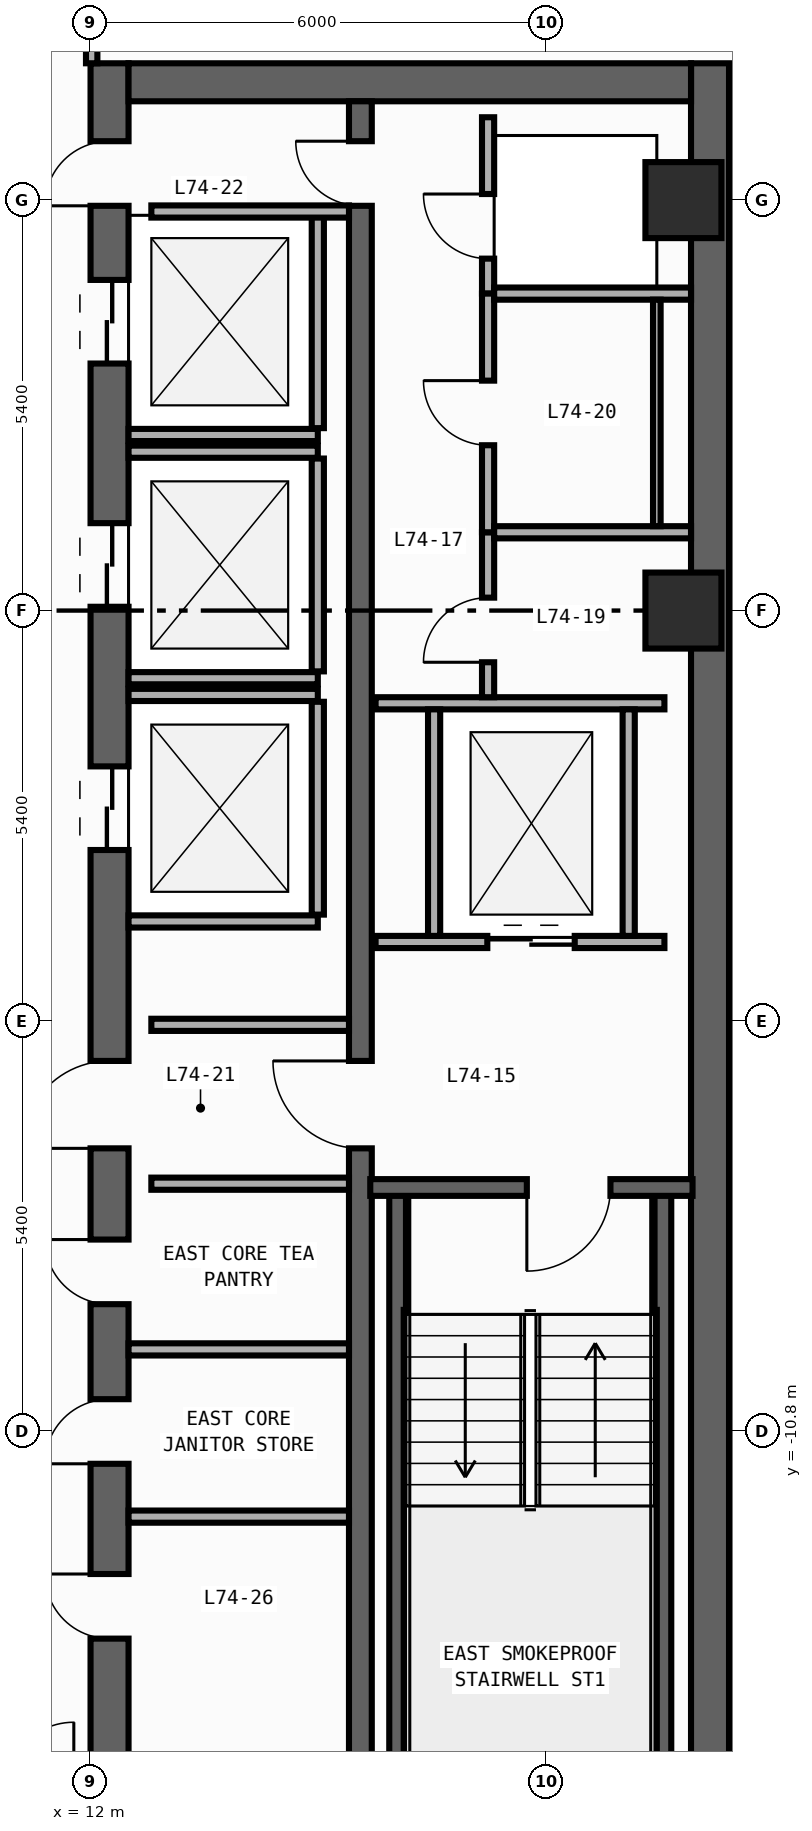
"""IFC4 building model, lengths in metres.
Left out: names, types, materials, properties, quantities, classifications, styles, units other than length and angle.
Written with IfcOpenShell. Run it as: python <this file> out.ifc"""

import sys

from ifc_helpers import new_model, si_unit, direction, frame, frame_2d, origin, origin_2d, place, context, subcontext, project, spatial, rectangle, circle, extrude, element, fill, save


model = new_model("IFC4")
c1 = context("Model", 3, precision=1e-05, world=origin(), true_north=direction((0.0, 1.0)))
c2 = subcontext(c1, "Body", "Model", "MODEL_VIEW")
j1 = project(units=[si_unit("LENGTHUNIT", "METRE"), si_unit("PLANEANGLEUNIT", "RADIAN")], contexts=[c1])
p1 = place(None, origin())
s1 = spatial("IfcSite", under=j1, at=p1, CompositionType="ELEMENT")
p2 = place(p1, origin())
s2 = spatial("IfcBuilding", under=s1, at=p2, CompositionType="ELEMENT")
p3 = place(p2, frame((0.0, 0.0, 308.0)))
s3 = spatial("IfcBuildingStorey", under=s2, at=p3, CompositionType="ELEMENT", Elevation=308.0)
p4 = place(p3, frame((12.25, -19.8, 0.0), z_axis=(0.0, 0.0, 1.0), x_axis=(0.0, 1.0, 0.0)))
e1 = element("IfcWall", 1, at=p4, inside=s3, PredefinedType="SHEAR", context=c2, shape_type="SweptSolid", body=[
    extrude(rectangle(XDim=27.0, YDim=0.5, at=frame_2d((13.5, 0.0))), origin(), (0.0, 0.0, 1.0), 3.54),
])
p5 = place(p4, frame((23.05, 0.0, 0.0)))
e2 = element("IfcOpeningElement", 2, at=p5, cuts=e1, PredefinedType="OPENING", context=c2, shape_type="SweptSolid", body=[
    extrude(rectangle(XDim=1.1, YDim=2.2, at=frame_2d((0.55, 1.1))), frame((0.0, 0.26, 0.0), z_axis=(0.0, -1.0, 0.0), x_axis=(1.0, 0.0, 0.0)), (0.0, 0.0, 1.0), 0.52),
])
p6 = place(p4, frame((19.85, 0.0, 0.0)))
e3 = element("IfcOpeningElement", 3, at=p6, cuts=e1, PredefinedType="OPENING", context=c2, shape_type="SweptSolid", body=[
    extrude(rectangle(XDim=1.1, YDim=2.2, at=frame_2d((0.55, 1.1))), frame((0.0, 0.26, 0.0), z_axis=(0.0, -1.0, 0.0), x_axis=(1.0, 0.0, 0.0)), (0.0, 0.0, 1.0), 0.52),
])
p7 = place(p4, frame((16.65, 0.0, 0.0)))
e4 = element("IfcOpeningElement", 4, at=p7, cuts=e1, PredefinedType="OPENING", context=c2, shape_type="SweptSolid", body=[
    extrude(rectangle(XDim=1.1, YDim=2.2, at=frame_2d((0.55, 1.1))), frame((0.0, 0.26, 0.0), z_axis=(0.0, -1.0, 0.0), x_axis=(1.0, 0.0, 0.0)), (0.0, 0.0, 1.0), 0.52),
])
p8 = place(p4, frame((6.275, 0.0, 0.0)))
e5 = element("IfcOpeningElement", 5, at=p8, cuts=e1, PredefinedType="OPENING", context=c2, shape_type="SweptSolid", body=[
    extrude(rectangle(XDim=0.85, YDim=2.1, at=frame_2d((0.425, 1.05))), frame((0.0, 0.26, 0.0), z_axis=(0.0, -1.0, 0.0), x_axis=(1.0, 0.0, 0.0)), (0.0, 0.0, 1.0), 0.52),
])
p9 = place(p4, frame((8.575, 0.0, 0.0)))
e6 = element("IfcOpeningElement", 6, at=p9, cuts=e1, PredefinedType="OPENING", context=c2, shape_type="SweptSolid", body=[
    extrude(rectangle(XDim=0.85, YDim=2.1, at=frame_2d((0.425, 1.05))), frame((0.0, 0.26, 0.0), z_axis=(0.0, -1.0, 0.0), x_axis=(1.0, 0.0, 0.0)), (0.0, 0.0, 1.0), 0.52),
])
p10 = place(p4, frame((10.675, 0.0, 0.0)))
e7 = element("IfcOpeningElement", 7, at=p10, cuts=e1, PredefinedType="OPENING", context=c2, shape_type="SweptSolid", body=[
    extrude(rectangle(XDim=0.85, YDim=2.1, at=frame_2d((0.425, 1.05))), frame((0.0, 0.26, 0.0), z_axis=(0.0, -1.0, 0.0), x_axis=(1.0, 0.0, 0.0)), (0.0, 0.0, 1.0), 0.52),
])
p11 = place(p4, frame((12.725, 0.0, 0.0)))
e8 = element("IfcOpeningElement", 8, at=p11, cuts=e1, PredefinedType="OPENING", context=c2, shape_type="SweptSolid", body=[
    extrude(rectangle(XDim=1.15, YDim=2.2, at=frame_2d((0.575, 1.1))), frame((0.0, 0.26, 0.0), z_axis=(0.0, -1.0, 0.0), x_axis=(1.0, 0.0, 0.0)), (0.0, 0.0, 1.0), 0.52),
])
p12 = place(p4, frame((25.125, 0.0, 0.0)))
e9 = element("IfcOpeningElement", 9, at=p12, cuts=e1, PredefinedType="OPENING", context=c2, shape_type="SweptSolid", body=[
    extrude(rectangle(XDim=0.85, YDim=2.1, at=frame_2d((0.425, 1.05))), frame((0.0, 0.26, 0.0), z_axis=(0.0, -1.0, 0.0), x_axis=(1.0, 0.0, 0.0)), (0.0, 0.0, 1.0), 0.52),
])
p13 = place(p3, frame((20.15, -19.8, 0.0), z_axis=(0.0, 0.0, 1.0), x_axis=(0.0, 1.0, 0.0)))
e10 = element("IfcWall", 10, at=p13, inside=s3, PredefinedType="SHEAR", context=c2, shape_type="SweptSolid", body=[
    extrude(rectangle(XDim=27.0, YDim=0.5, at=frame_2d((13.5, 0.0))), origin(), (0.0, 0.0, 1.0), 3.54),
])
p14 = place(p3, frame((12.5, 6.95, 0.0), z_axis=(0.0, 0.0, 1.0), x_axis=(1.0, 0.0, 0.0)))
e11 = element("IfcWall", 11, at=p14, inside=s3, PredefinedType="SHEAR", context=c2, shape_type="SweptSolid", body=[
    extrude(rectangle(XDim=7.4, YDim=0.5, at=frame_2d((3.7, 0.0))), origin(), (0.0, 0.0, 1.0), 3.54),
])
p15 = place(p3, frame((15.55, -19.3, 0.0), z_axis=(0.0, 0.0, 1.0), x_axis=(0.0, 1.0, 0.0)))
e12 = element("IfcWall", 12, at=p15, inside=s3, PredefinedType="SHEAR", context=c2, shape_type="SweptSolid", body=[
    extrude(rectangle(XDim=26.0, YDim=0.3, at=frame_2d((13.0, 0.0))), origin(), (0.0, 0.0, 1.0), 3.54),
])
p16 = place(p15, frame((12.225, 0.0, 0.0)))
e13 = element("IfcOpeningElement", 13, at=p16, cuts=e12, PredefinedType="OPENING", context=c2, shape_type="SweptSolid", body=[
    extrude(rectangle(XDim=1.15, YDim=2.2, at=frame_2d((0.575, 1.1))), frame((0.0, 0.16, 0.0), z_axis=(0.0, -1.0, 0.0), x_axis=(1.0, 0.0, 0.0)), (0.0, 0.0, 1.0), 0.32),
])
p17 = place(p15, frame((24.625, 0.0, 0.0)))
e14 = element("IfcOpeningElement", 14, at=p17, cuts=e12, PredefinedType="OPENING", context=c2, shape_type="SweptSolid", body=[
    extrude(rectangle(XDim=0.85, YDim=2.1, at=frame_2d((0.425, 1.05))), frame((0.0, 0.16, 0.0), z_axis=(0.0, -1.0, 0.0), x_axis=(1.0, 0.0, 0.0)), (0.0, 0.0, 1.0), 0.32),
])
for number, where, z_axis, x_axis in (
    (15, (16.04, -19.01, 0.0), (0.0, 0.0, 1.0), (0.0, 1.0, 0.0)),
    (16, (19.53, -19.01, 0.0), (0.0, 0.0, 1.0), (0.0, 1.0, 0.0)),
):
    element("IfcWall", number, at=place(p3, frame(where, z_axis=z_axis, x_axis=x_axis)), inside=s3, PredefinedType="SHEAR", context=c2, shape_type="SweptSolid", body=[
        extrude(rectangle(XDim=11.42, YDim=0.22, at=frame_2d((5.71, 0.0))), origin(), (0.0, 0.0, 1.0), 3.54),
    ])
p18 = place(p3, frame((19.92, -7.59, 0.0), z_axis=(0.0, 0.0, 1.0), x_axis=(-1.0, 0.0, 0.0)))
e17 = element("IfcWall", 17, at=p18, inside=s3, PredefinedType="SHEAR", context=c2, shape_type="SweptSolid", body=[
    extrude(rectangle(XDim=4.24, YDim=0.22, at=frame_2d((2.12, 0.0))), origin(), (0.0, 0.0, 1.0), 3.54),
])
p19 = place(p18, frame((1.08, 0.0, 0.0)))
e18 = element("IfcOpeningElement", 18, at=p19, cuts=e17, PredefinedType="OPENING", context=c2, shape_type="SweptSolid", body=[
    extrude(rectangle(XDim=1.1, YDim=2.2, at=frame_2d((0.55, 1.1))), frame((0.0, 0.12, 0.0), z_axis=(0.0, -1.0, 0.0), x_axis=(1.0, 0.0, 0.0)), (0.0, 0.0, 1.0), 0.24),
])
for number, where, z_axis, x_axis in (
    (19, (19.8, 0.0, 0.0), (0.0, 0.0, 1.0), (1.0, 0.0, 0.0)),
    (20, (19.8, 5.4, 0.0), (0.0, 0.0, 1.0), (1.0, 0.0, 0.0)),
):
    element("IfcColumn", number, at=place(p3, frame(where, z_axis=z_axis, x_axis=x_axis)), inside=s3, PredefinedType="COLUMN", context=c2, shape_type="SweptSolid", body=[
        extrude(circle(Radius=0.5, at=origin_2d()), origin(), (0.0, 0.0, 1.0), 3.8),
    ])
p20 = place(p3, frame((12.5, 2.31, 0.0), z_axis=(0.0, 0.0, 1.0), x_axis=(1.0, 0.0, 0.0)))
e21 = element("IfcWall", 21, at=p20, inside=s3, PredefinedType="STANDARD", context=c2, shape_type="SweptSolid", body=[
    extrude(rectangle(XDim=2.49, YDim=0.16, at=frame_2d((1.245, 0.0))), origin(), (0.0, 0.0, 1.0), 3.54),
])
p21 = place(p3, frame((14.99, 2.4, 0.0), z_axis=(0.0, 0.0, 1.0), x_axis=(0.0, 1.0, 0.0)))
e22 = element("IfcWall", 22, at=p21, inside=s3, PredefinedType="STANDARD", context=c2, shape_type="SweptSolid", body=[
    extrude(rectangle(XDim=2.8, YDim=0.16, at=frame_2d((1.4, 0.0))), origin(), (0.0, 0.0, 1.0), 3.54),
])
for number, where, z_axis, x_axis in (
    (23, (12.5, -0.89, 0.0), (0.0, 0.0, 1.0), (1.0, 0.0, 0.0)),
    (24, (12.5, 2.09, 0.0), (0.0, 0.0, 1.0), (1.0, 0.0, 0.0)),
):
    element("IfcWall", number, at=place(p3, frame(where, z_axis=z_axis, x_axis=x_axis)), inside=s3, PredefinedType="STANDARD", context=c2, shape_type="SweptSolid", body=[
        extrude(rectangle(XDim=2.49, YDim=0.16, at=frame_2d((1.245, 0.0))), origin(), (0.0, 0.0, 1.0), 3.54),
    ])
p22 = place(p3, frame((14.99, -0.8, 0.0), z_axis=(0.0, 0.0, 1.0), x_axis=(0.0, 1.0, 0.0)))
e25 = element("IfcWall", 25, at=p22, inside=s3, PredefinedType="STANDARD", context=c2, shape_type="SweptSolid", body=[
    extrude(rectangle(XDim=2.8, YDim=0.16, at=frame_2d((1.4, 0.0))), origin(), (0.0, 0.0, 1.0), 3.54),
])
for number, where, z_axis, x_axis in (
    (26, (12.5, -4.09, 0.0), (0.0, 0.0, 1.0), (1.0, 0.0, 0.0)),
    (27, (12.5, -1.11, 0.0), (0.0, 0.0, 1.0), (1.0, 0.0, 0.0)),
):
    element("IfcWall", number, at=place(p3, frame(where, z_axis=z_axis, x_axis=x_axis)), inside=s3, PredefinedType="STANDARD", context=c2, shape_type="SweptSolid", body=[
        extrude(rectangle(XDim=2.49, YDim=0.16, at=frame_2d((1.245, 0.0))), origin(), (0.0, 0.0, 1.0), 3.54),
    ])
p23 = place(p3, frame((14.99, -4.0, 0.0), z_axis=(0.0, 0.0, 1.0), x_axis=(0.0, 1.0, 0.0)))
e28 = element("IfcWall", 28, at=p23, inside=s3, PredefinedType="STANDARD", context=c2, shape_type="SweptSolid", body=[
    extrude(rectangle(XDim=2.8, YDim=0.16, at=frame_2d((1.4, 0.0))), origin(), (0.0, 0.0, 1.0), 3.54),
])
p24 = place(p3, frame((15.75, -4.36, 0.0), z_axis=(0.0, 0.0, 1.0), x_axis=(1.0, 0.0, 0.0)))
e29 = element("IfcWall", 29, at=p24, inside=s3, PredefinedType="STANDARD", context=c2, shape_type="SweptSolid", body=[
    extrude(rectangle(XDim=3.8, YDim=0.16, at=frame_2d((1.9, 0.0))), origin(), (0.0, 0.0, 1.0), 3.54),
])
p25 = place(p24, frame((1.47, 0.0, 0.0)))
e30 = element("IfcOpeningElement", 30, at=p25, cuts=e29, PredefinedType="OPENING", context=c2, shape_type="SweptSolid", body=[
    extrude(rectangle(XDim=1.15, YDim=2.2, at=frame_2d((0.575, 1.1))), frame((0.0, 0.09, 0.0), z_axis=(0.0, -1.0, 0.0), x_axis=(1.0, 0.0, 0.0)), (0.0, 0.0, 1.0), 0.18),
])
p26 = place(p3, frame((15.75, -1.22, 0.0), z_axis=(0.0, 0.0, 1.0), x_axis=(1.0, 0.0, 0.0)))
e31 = element("IfcWall", 31, at=p26, inside=s3, PredefinedType="STANDARD", context=c2, shape_type="SweptSolid", body=[
    extrude(rectangle(XDim=3.8, YDim=0.16, at=frame_2d((1.9, 0.0))), origin(), (0.0, 0.0, 1.0), 3.54),
])
for number, where, z_axis, x_axis in (
    (32, (16.52, -4.28, 0.0), (0.0, 0.0, 1.0), (0.0, 1.0, 0.0)),
    (33, (19.08, -4.28, 0.0), (0.0, 0.0, 1.0), (0.0, 1.0, 0.0)),
):
    element("IfcWall", number, at=place(p3, frame(where, z_axis=z_axis, x_axis=x_axis)), inside=s3, PredefinedType="STANDARD", context=c2, shape_type="SweptSolid", body=[
        extrude(rectangle(XDim=2.98, YDim=0.16, at=frame_2d((1.49, 0.0))), origin(), (0.0, 0.0, 1.0), 3.54),
    ])
for number, where, z_axis, x_axis in (
    (34, (12.8, -5.45, 0.0), (0.0, 0.0, 1.0), (1.0, 0.0, 0.0)),
    (35, (12.8, -7.54, 0.0), (0.0, 0.0, 1.0), (1.0, 0.0, 0.0)),
    (36, (12.8, 5.25, 0.0), (0.0, 0.0, 1.0), (1.0, 0.0, 0.0)),
):
    element("IfcWall", number, at=place(p3, frame(where, z_axis=z_axis, x_axis=x_axis)), inside=s3, PredefinedType="STANDARD", context=c2, shape_type="SweptSolid", body=[
        extrude(rectangle(XDim=2.6, YDim=0.16, at=frame_2d((1.3, 0.0))), origin(), (0.0, 0.0, 1.0), 3.54),
    ])
p27 = place(p3, frame((17.23, 4.17, 0.0), z_axis=(0.0, 0.0, 1.0), x_axis=(0.0, 1.0, 0.0)))
e37 = element("IfcWall", 37, at=p27, inside=s3, PredefinedType="PARTITIONING", context=c2, shape_type="SweptSolid", body=[
    extrude(rectangle(XDim=2.32, YDim=0.16, at=frame_2d((1.16, 0.0))), origin(), (0.0, 0.0, 1.0), 3.54),
])
p28 = place(p27, frame((0.46, 0.0, 0.0)))
e38 = element("IfcOpeningElement", 38, at=p28, cuts=e37, PredefinedType="OPENING", context=c2, shape_type="SweptSolid", body=[
    extrude(rectangle(XDim=0.85, YDim=2.1, at=frame_2d((0.425, 1.05))), frame((0.0, 0.09, 0.0), z_axis=(0.0, -1.0, 0.0), x_axis=(1.0, 0.0, 0.0)), (0.0, 0.0, 1.0), 0.18),
])
p29 = place(p3, frame((17.23, -1.14, 0.0), z_axis=(0.0, 0.0, 1.0), x_axis=(0.0, 1.0, 0.0)))
e39 = element("IfcWall", 39, at=p29, inside=s3, PredefinedType="PARTITIONING", context=c2, shape_type="SweptSolid", body=[
    extrude(rectangle(XDim=2.17, YDim=0.16, at=frame_2d((1.085, 0.0))), origin(), (0.0, 0.0, 1.0), 3.54),
])
p30 = place(p29, frame((0.46, 0.0, 0.0)))
e40 = element("IfcOpeningElement", 40, at=p30, cuts=e39, PredefinedType="OPENING", context=c2, shape_type="SweptSolid", body=[
    extrude(rectangle(XDim=0.85, YDim=2.1, at=frame_2d((0.425, 1.05))), frame((0.0, 0.09, 0.0), z_axis=(0.0, -1.0, 0.0), x_axis=(1.0, 0.0, 0.0)), (0.0, 0.0, 1.0), 0.18),
])
p31 = place(p3, frame((17.23, 1.03, 0.0), z_axis=(0.0, 0.0, 1.0), x_axis=(0.0, 1.0, 0.0)))
e41 = element("IfcWall", 41, at=p31, inside=s3, PredefinedType="PARTITIONING", context=c2, shape_type="SweptSolid", body=[
    extrude(rectangle(XDim=3.14, YDim=0.16, at=frame_2d((1.57, 0.0))), origin(), (0.0, 0.0, 1.0), 3.54),
])
p32 = place(p31, frame((1.145, 0.0, 0.0)))
e42 = element("IfcOpeningElement", 42, at=p32, cuts=e41, PredefinedType="OPENING", context=c2, shape_type="SweptSolid", body=[
    extrude(rectangle(XDim=0.85, YDim=2.1, at=frame_2d((0.425, 1.05))), frame((0.0, 0.09, 0.0), z_axis=(0.0, -1.0, 0.0), x_axis=(1.0, 0.0, 0.0)), (0.0, 0.0, 1.0), 0.18),
])
for number, where, z_axis, x_axis in (
    (43, (17.31, 4.17, 0.0), (0.0, 0.0, 1.0), (1.0, 0.0, 0.0)),
    (44, (17.31, 1.03, 0.0), (0.0, 0.0, 1.0), (1.0, 0.0, 0.0)),
):
    element("IfcWall", number, at=place(p3, frame(where, z_axis=z_axis, x_axis=x_axis)), inside=s3, PredefinedType="PARTITIONING", context=c2, shape_type="SweptSolid", body=[
        extrude(rectangle(XDim=2.59, YDim=0.16, at=frame_2d((1.295, 0.0))), origin(), (0.0, 0.0, 1.0), 3.54),
    ])
for number, where, z_axis, x_axis in (
    (45, (12.5, -11.92, 0.0), (0.0, 0.0, 1.0), (1.0, 0.0, 0.0)),
    (46, (12.5, -9.72, 0.0), (0.0, 0.0, 1.0), (1.0, 0.0, 0.0)),
):
    element("IfcWall", number, at=place(p3, frame(where, z_axis=z_axis, x_axis=x_axis)), inside=s3, PredefinedType="PARTITIONING", context=c2, shape_type="SweptSolid", body=[
        extrude(rectangle(XDim=2.9, YDim=0.16, at=frame_2d((1.45, 0.0))), origin(), (0.0, 0.0, 1.0), 3.54),
    ])
p33 = place(p3, frame((12.015, 7.2, 0.0), z_axis=(0.0, 0.0, 1.0), x_axis=(0.0, 1.0, 0.0)))
e47 = element("IfcWall", 47, at=p33, inside=s3, PredefinedType="PARTITIONING", context=c2, shape_type="SweptSolid", body=[
    extrude(rectangle(XDim=6.68, YDim=0.15, at=frame_2d((3.34, 0.0))), origin(), (0.0, 0.0, 1.0), 3.54),
])
p34 = place(p33, frame((0.67, 0.0, 0.0)))
e48 = element("IfcOpeningElement", 48, at=p34, cuts=e47, PredefinedType="OPENING", context=c2, shape_type="SweptSolid", body=[
    extrude(rectangle(XDim=0.9, YDim=2.15, at=frame_2d((0.45, 1.075))), frame((0.0, 0.085, 0.0), z_axis=(0.0, -1.0, 0.0), x_axis=(1.0, 0.0, 0.0)), (0.0, 0.0, 1.0), 0.17),
])
p35 = place(p3, frame((19.45, 4.09, 0.0), z_axis=(0.0, 0.0, 1.0), x_axis=(0.0, -1.0, 0.0)))
e49 = element("IfcWall", 49, at=p35, inside=s3, PredefinedType="PARTITIONING", context=c2, shape_type="SweptSolid", body=[
    extrude(rectangle(XDim=2.98, YDim=0.1, at=frame_2d((1.49, 0.0))), origin(), (0.0, 0.0, 1.0), 3.54),
])
p36 = place(p19, origin())
e50 = element("IfcDoor", 50, at=p36, inside=s3, OperationType="SINGLE_SWING_RIGHT", PredefinedType="DOOR", context=c2, shape_type="SweptSolid", body=[
    extrude(rectangle(XDim=1.1, YDim=2.2, at=frame_2d((0.55, 1.1))), frame((0.0, 0.025, 0.0), z_axis=(0.0, -1.0, 0.0), x_axis=(1.0, 0.0, 0.0)), (0.0, 0.0, 1.0), 0.05),
])
fill(e18, e50)
p37 = place(p5, origin())
e51 = element("IfcDoor", 51, at=p37, inside=s3, OperationType="DOUBLE_DOOR_SLIDING", PredefinedType="DOOR", context=c2, shape_type="SweptSolid", body=[
    extrude(rectangle(XDim=1.1, YDim=2.2, at=frame_2d((0.55, 1.1))), frame((0.0, 0.025, 0.0), z_axis=(0.0, -1.0, 0.0), x_axis=(1.0, 0.0, 0.0)), (0.0, 0.0, 1.0), 0.05),
])
fill(e2, e51)
p38 = place(p6, origin())
e52 = element("IfcDoor", 52, at=p38, inside=s3, OperationType="DOUBLE_DOOR_SLIDING", PredefinedType="DOOR", context=c2, shape_type="SweptSolid", body=[
    extrude(rectangle(XDim=1.1, YDim=2.2, at=frame_2d((0.55, 1.1))), frame((0.0, 0.025, 0.0), z_axis=(0.0, -1.0, 0.0), x_axis=(1.0, 0.0, 0.0)), (0.0, 0.0, 1.0), 0.05),
])
fill(e3, e52)
p39 = place(p7, origin())
e53 = element("IfcDoor", 53, at=p39, inside=s3, OperationType="DOUBLE_DOOR_SLIDING", PredefinedType="DOOR", context=c2, shape_type="SweptSolid", body=[
    extrude(rectangle(XDim=1.1, YDim=2.2, at=frame_2d((0.55, 1.1))), frame((0.0, 0.025, 0.0), z_axis=(0.0, -1.0, 0.0), x_axis=(1.0, 0.0, 0.0)), (0.0, 0.0, 1.0), 0.05),
])
fill(e4, e53)
p40 = place(p8, origin())
e54 = element("IfcDoor", 54, at=p40, inside=s3, OperationType="SINGLE_SWING_RIGHT", PredefinedType="DOOR", context=c2, shape_type="SweptSolid", body=[
    extrude(rectangle(XDim=0.85, YDim=2.1, at=frame_2d((0.425, 1.05))), frame((0.0, 0.025, 0.0), z_axis=(0.0, -1.0, 0.0), x_axis=(1.0, 0.0, 0.0)), (0.0, 0.0, 1.0), 0.05),
])
fill(e5, e54)
p41 = place(p9, origin())
e55 = element("IfcDoor", 55, at=p41, inside=s3, OperationType="SINGLE_SWING_LEFT", PredefinedType="DOOR", context=c2, shape_type="SweptSolid", body=[
    extrude(rectangle(XDim=0.85, YDim=2.1, at=frame_2d((0.425, 1.05))), frame((0.0, 0.025, 0.0), z_axis=(0.0, -1.0, 0.0), x_axis=(1.0, 0.0, 0.0)), (0.0, 0.0, 1.0), 0.05),
])
fill(e6, e55)
p42 = place(p10, origin())
e56 = element("IfcDoor", 56, at=p42, inside=s3, OperationType="SINGLE_SWING_RIGHT", PredefinedType="DOOR", context=c2, shape_type="SweptSolid", body=[
    extrude(rectangle(XDim=0.85, YDim=2.1, at=frame_2d((0.425, 1.05))), frame((0.0, 0.025, 0.0), z_axis=(0.0, -1.0, 0.0), x_axis=(1.0, 0.0, 0.0)), (0.0, 0.0, 1.0), 0.05),
])
fill(e7, e56)
p43 = place(p11, origin())
e57 = element("IfcDoor", 57, at=p43, inside=s3, OperationType="SINGLE_SWING_LEFT", PredefinedType="DOOR", context=c2, shape_type="SweptSolid", body=[
    extrude(rectangle(XDim=1.15, YDim=2.2, at=frame_2d((0.575, 1.1))), frame((0.0, 0.025, 0.0), z_axis=(0.0, -1.0, 0.0), x_axis=(1.0, 0.0, 0.0)), (0.0, 0.0, 1.0), 0.05),
])
fill(e8, e57)
p44 = place(p16, origin())
e58 = element("IfcDoor", 58, at=p44, inside=s3, OperationType="SINGLE_SWING_RIGHT", PredefinedType="DOOR", context=c2, shape_type="SweptSolid", body=[
    extrude(rectangle(XDim=1.15, YDim=2.2, at=frame_2d((0.575, 1.1))), frame((0.0, 0.025, 0.0), z_axis=(0.0, -1.0, 0.0), x_axis=(1.0, 0.0, 0.0)), (0.0, 0.0, 1.0), 0.05),
])
fill(e13, e58)
p45 = place(p12, origin())
e59 = element("IfcDoor", 59, at=p45, inside=s3, OperationType="SINGLE_SWING_LEFT", PredefinedType="DOOR", context=c2, shape_type="SweptSolid", body=[
    extrude(rectangle(XDim=0.85, YDim=2.1, at=frame_2d((0.425, 1.05))), frame((0.0, 0.025, 0.0), z_axis=(0.0, -1.0, 0.0), x_axis=(1.0, 0.0, 0.0)), (0.0, 0.0, 1.0), 0.05),
])
fill(e9, e59)
p46 = place(p17, origin())
e60 = element("IfcDoor", 60, at=p46, inside=s3, OperationType="SINGLE_SWING_RIGHT", PredefinedType="DOOR", context=c2, shape_type="SweptSolid", body=[
    extrude(rectangle(XDim=0.85, YDim=2.1, at=frame_2d((0.425, 1.05))), frame((0.0, 0.025, 0.0), z_axis=(0.0, -1.0, 0.0), x_axis=(1.0, 0.0, 0.0)), (0.0, 0.0, 1.0), 0.05),
])
fill(e14, e60)
p47 = place(p25, origin())
e61 = element("IfcDoor", 61, at=p47, inside=s3, OperationType="DOUBLE_DOOR_SLIDING", PredefinedType="DOOR", context=c2, shape_type="SweptSolid", body=[
    extrude(rectangle(XDim=1.15, YDim=2.2, at=frame_2d((0.575, 1.1))), frame((0.0, 0.025, 0.0), z_axis=(0.0, -1.0, 0.0), x_axis=(1.0, 0.0, 0.0)), (0.0, 0.0, 1.0), 0.05),
])
fill(e30, e61)
p48 = place(p28, origin())
e62 = element("IfcDoor", 62, at=p48, inside=s3, OperationType="SINGLE_SWING_RIGHT", PredefinedType="DOOR", context=c2, shape_type="SweptSolid", body=[
    extrude(rectangle(XDim=0.85, YDim=2.1, at=frame_2d((0.425, 1.05))), frame((0.0, 0.025, 0.0), z_axis=(0.0, -1.0, 0.0), x_axis=(1.0, 0.0, 0.0)), (0.0, 0.0, 1.0), 0.05),
])
fill(e38, e62)
p49 = place(p30, origin())
e63 = element("IfcDoor", 63, at=p49, inside=s3, OperationType="SINGLE_SWING_LEFT", PredefinedType="DOOR", context=c2, shape_type="SweptSolid", body=[
    extrude(rectangle(XDim=0.85, YDim=2.1, at=frame_2d((0.425, 1.05))), frame((0.0, 0.025, 0.0), z_axis=(0.0, -1.0, 0.0), x_axis=(1.0, 0.0, 0.0)), (0.0, 0.0, 1.0), 0.05),
])
fill(e40, e63)
p50 = place(p32, origin())
e64 = element("IfcDoor", 64, at=p50, inside=s3, OperationType="SINGLE_SWING_RIGHT", PredefinedType="DOOR", context=c2, shape_type="SweptSolid", body=[
    extrude(rectangle(XDim=0.85, YDim=2.1, at=frame_2d((0.425, 1.05))), frame((0.0, 0.025, 0.0), z_axis=(0.0, -1.0, 0.0), x_axis=(1.0, 0.0, 0.0)), (0.0, 0.0, 1.0), 0.05),
])
fill(e42, e64)
save(model, sys.argv[1])
